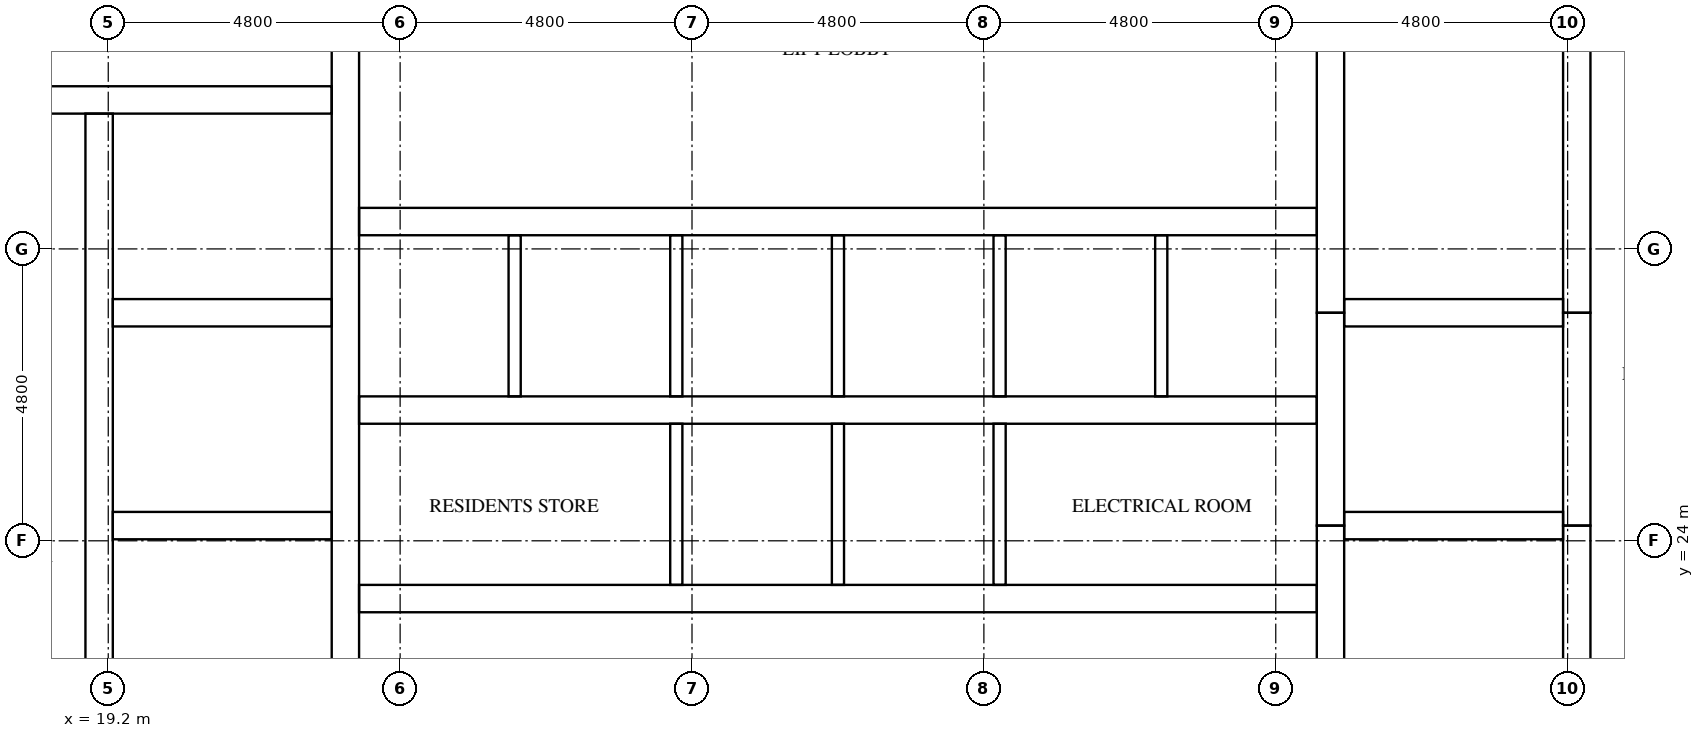
"""IFC4 building model, lengths in metres.
Left out: names, types, materials, properties, quantities, classifications, styles, units other than length and angle.
Written with IfcOpenShell. Run it as: python <this file> out.ifc"""

import sys

from ifc_helpers import new_model, si_unit, direction, frame, frame_2d, origin, place, context, subcontext, project, spatial, rectangle, extrude, element, fill, save


model = new_model("IFC4")
c1 = context("Model", 3, precision=1e-05, world=origin(), true_north=direction((0.0, 1.0)))
c2 = subcontext(c1, "Body", "Model", "MODEL_VIEW")
j1 = project(units=[si_unit("LENGTHUNIT", "METRE"), si_unit("PLANEANGLEUNIT", "RADIAN")], contexts=[c1])
p1 = place(None, origin())
s1 = spatial("IfcSite", under=j1, at=p1, CompositionType="ELEMENT")
p2 = place(p1, origin())
s2 = spatial("IfcBuilding", under=s1, at=p2, CompositionType="ELEMENT")
p3 = place(p2, frame((0.0, 0.0, 252.7)))
s3 = spatial("IfcBuildingStorey", under=s2, at=p3, CompositionType="ELEMENT", Elevation=252.7)
p4 = place(p3, frame((19.05, 15.6, 0.0), z_axis=(0.0, 0.0, 1.0), x_axis=(0.0, 1.0, 0.0)))
e1 = element("IfcWall", 1, at=p4, inside=s3, PredefinedType="SHEAR", context=c2, shape_type="SweptSolid", body=[
    extrude(rectangle(XDim=15.425, YDim=0.45, at=frame_2d((7.712, 0.0))), origin(), (0.0, 0.0, 1.0), 3.2),
])
p5 = place(p4, frame((9.85, 0.0, 0.0)))
e2 = element("IfcOpeningElement", 2, at=p5, cuts=e1, PredefinedType="OPENING", context=c2, shape_type="SweptSolid", body=[
    extrude(rectangle(XDim=1.1, YDim=2.1, at=frame_2d((0.55, 1.05))), frame((0.0, 0.235, 0.0), z_axis=(0.0, -1.0, 0.0), x_axis=(1.0, 0.0, 0.0)), (0.0, 0.0, 1.0), 0.47),
])
p6 = place(p4, frame((13.35, 0.0, 0.0)))
e3 = element("IfcOpeningElement", 3, at=p6, cuts=e1, PredefinedType="OPENING", context=c2, shape_type="SweptSolid", body=[
    extrude(rectangle(XDim=1.1, YDim=2.1, at=frame_2d((0.55, 1.05))), frame((0.0, 0.235, 0.0), z_axis=(0.0, -1.0, 0.0), x_axis=(1.0, 0.0, 0.0)), (0.0, 0.0, 1.0), 0.47),
])
p7 = place(p4, frame((0.6, 0.0, 0.0)))
e4 = element("IfcOpeningElement", 4, at=p7, cuts=e1, PredefinedType="OPENING", context=c2, shape_type="SweptSolid", body=[
    extrude(rectangle(XDim=1.2, YDim=2.1, at=frame_2d((0.6, 1.05))), frame((0.0, 0.235, 0.0), z_axis=(0.0, -1.0, 0.0), x_axis=(1.0, 0.0, 0.0)), (0.0, 0.0, 1.0), 0.47),
])
p8 = place(p3, frame((23.1, 15.6, 0.0), z_axis=(0.0, 0.0, 1.0), x_axis=(0.0, 1.0, 0.0)))
e5 = element("IfcWall", 5, at=p8, inside=s3, PredefinedType="SHEAR", context=c2, shape_type="SweptSolid", body=[
    extrude(rectangle(XDim=21.6, YDim=0.45, at=frame_2d((10.8, 0.0))), origin(), (0.0, 0.0, 1.0), 3.2),
])
p9 = place(p3, frame((39.3, 15.6, 0.0), z_axis=(0.0, 0.0, 1.0), x_axis=(0.0, 1.0, 0.0)))
e6 = element("IfcWall", 6, at=p9, inside=s3, PredefinedType="SHEAR", context=c2, shape_type="SweptSolid", body=[
    extrude(rectangle(XDim=8.65, YDim=0.45, at=frame_2d((4.325, 0.0))), origin(), (0.0, 0.0, 1.0), 3.2),
])
p10 = place(p3, frame((39.3, 24.25, 0.0), z_axis=(0.0, 0.0, 1.0), x_axis=(0.0, 1.0, 0.0)))
e7 = element("IfcWall", 7, at=p10, inside=s3, PredefinedType="SHEAR", context=c2, shape_type="SweptSolid", body=[
    extrude(rectangle(XDim=3.5, YDim=0.45, at=frame_2d((1.75, 0.0))), origin(), (0.0, 0.0, 1.0), 3.2),
])
p11 = place(p3, frame((39.3, 27.75, 0.0), z_axis=(0.0, 0.0, 1.0), x_axis=(0.0, 1.0, 0.0)))
e8 = element("IfcWall", 8, at=p11, inside=s3, PredefinedType="SHEAR", context=c2, shape_type="SweptSolid", body=[
    extrude(rectangle(XDim=9.45, YDim=0.45, at=frame_2d((4.725, 0.0))), origin(), (0.0, 0.0, 1.0), 3.2),
])
p12 = place(p3, frame((43.35, 15.6, 0.0), z_axis=(0.0, 0.0, 1.0), x_axis=(0.0, 1.0, 0.0)))
e9 = element("IfcWall", 9, at=p12, inside=s3, PredefinedType="SHEAR", context=c2, shape_type="SweptSolid", body=[
    extrude(rectangle(XDim=8.65, YDim=0.45, at=frame_2d((4.325, 0.0))), origin(), (0.0, 0.0, 1.0), 3.2),
])
p13 = place(p12, frame((0.6, 0.0, 0.0)))
e10 = element("IfcOpeningElement", 10, at=p13, cuts=e9, PredefinedType="OPENING", context=c2, shape_type="SweptSolid", body=[
    extrude(rectangle(XDim=1.2, YDim=2.1, at=frame_2d((0.6, 1.05))), frame((0.0, 0.235, 0.0), z_axis=(0.0, -1.0, 0.0), x_axis=(1.0, 0.0, 0.0)), (0.0, 0.0, 1.0), 0.47),
])
p14 = place(p3, frame((43.35, 24.25, 0.0), z_axis=(0.0, 0.0, 1.0), x_axis=(0.0, 1.0, 0.0)))
e11 = element("IfcWall", 11, at=p14, inside=s3, PredefinedType="SHEAR", context=c2, shape_type="SweptSolid", body=[
    extrude(rectangle(XDim=3.5, YDim=0.45, at=frame_2d((1.75, 0.0))), origin(), (0.0, 0.0, 1.0), 3.2),
])
p15 = place(p14, frame((1.2, 0.0, 0.0)))
e12 = element("IfcOpeningElement", 12, at=p15, cuts=e11, PredefinedType="OPENING", context=c2, shape_type="SweptSolid", body=[
    extrude(rectangle(XDim=1.1, YDim=2.1, at=frame_2d((0.55, 1.05))), frame((0.0, 0.235, 0.0), z_axis=(0.0, -1.0, 0.0), x_axis=(1.0, 0.0, 0.0)), (0.0, 0.0, 1.0), 0.47),
])
p16 = place(p3, frame((43.35, 27.75, 0.0), z_axis=(0.0, 0.0, 1.0), x_axis=(0.0, 1.0, 0.0)))
e13 = element("IfcWall", 13, at=p16, inside=s3, PredefinedType="SHEAR", context=c2, shape_type="SweptSolid", body=[
    extrude(rectangle(XDim=9.45, YDim=0.45, at=frame_2d((4.725, 0.0))), origin(), (0.0, 0.0, 1.0), 3.2),
])
p17 = place(p16, frame((7.65, 0.0, 0.0)))
e14 = element("IfcOpeningElement", 14, at=p17, cuts=e13, PredefinedType="OPENING", context=c2, shape_type="SweptSolid", body=[
    extrude(rectangle(XDim=1.2, YDim=2.1, at=frame_2d((0.6, 1.05))), frame((0.0, 0.235, 0.0), z_axis=(0.0, -1.0, 0.0), x_axis=(1.0, 0.0, 0.0)), (0.0, 0.0, 1.0), 0.47),
])
for number, where, z_axis, x_axis in (
    (15, (19.275, 24.25, 0.0), (0.0, 0.0, 1.0), (1.0, 0.0, 0.0)),
    (16, (19.275, 27.75, 0.0), (0.0, 0.0, 1.0), (1.0, 0.0, 0.0)),
):
    element("IfcWall", number, at=place(p3, frame(where, z_axis=z_axis, x_axis=x_axis)), inside=s3, PredefinedType="SHEAR", context=c2, shape_type="SweptSolid", body=[
        extrude(rectangle(XDim=3.6, YDim=0.45, at=frame_2d((1.8, 0.0))), origin(), (0.0, 0.0, 1.0), 3.2),
    ])
p18 = place(p3, frame((15.6, 31.25, 0.0), z_axis=(0.0, 0.0, 1.0), x_axis=(1.0, 0.0, 0.0)))
e17 = element("IfcWall", 17, at=p18, inside=s3, PredefinedType="SHEAR", context=c2, shape_type="SweptSolid", body=[
    extrude(rectangle(XDim=7.275, YDim=0.45, at=frame_2d((3.637, 0.0))), origin(), (0.0, 0.0, 1.0), 3.2),
])
for number, where, z_axis, x_axis in (
    (18, (39.525, 24.25, 0.0), (0.0, 0.0, 1.0), (1.0, 0.0, 0.0)),
    (19, (39.525, 27.75, 0.0), (0.0, 0.0, 1.0), (1.0, 0.0, 0.0)),
):
    element("IfcWall", number, at=place(p3, frame(where, z_axis=z_axis, x_axis=x_axis)), inside=s3, PredefinedType="SHEAR", context=c2, shape_type="SweptSolid", body=[
        extrude(rectangle(XDim=3.6, YDim=0.45, at=frame_2d((1.8, 0.0))), origin(), (0.0, 0.0, 1.0), 3.2),
    ])
p19 = place(p3, frame((23.325, 23.05, 0.0), z_axis=(0.0, 0.0, 1.0), x_axis=(1.0, 0.0, 0.0)))
e20 = element("IfcWall", 20, at=p19, inside=s3, PredefinedType="SHEAR", context=c2, shape_type="SweptSolid", body=[
    extrude(rectangle(XDim=15.75, YDim=0.45, at=frame_2d((7.875, 0.0))), origin(), (0.0, 0.0, 1.0), 3.2),
])
p20 = place(p19, frame((2.058, 0.0, 0.0)))
e21 = element("IfcOpeningElement", 21, at=p20, cuts=e20, PredefinedType="OPENING", context=c2, shape_type="SweptSolid", body=[
    extrude(rectangle(XDim=1.0, YDim=2.1, at=frame_2d((0.5, 1.05))), frame((0.0, 0.235, 0.0), z_axis=(0.0, -1.0, 0.0), x_axis=(1.0, 0.0, 0.0)), (0.0, 0.0, 1.0), 0.47),
])
p21 = place(p19, frame((12.692, 0.0, 0.0)))
e22 = element("IfcOpeningElement", 22, at=p21, cuts=e20, PredefinedType="OPENING", context=c2, shape_type="SweptSolid", body=[
    extrude(rectangle(XDim=1.0, YDim=2.1, at=frame_2d((0.5, 1.05))), frame((0.0, 0.235, 0.0), z_axis=(0.0, -1.0, 0.0), x_axis=(1.0, 0.0, 0.0)), (0.0, 0.0, 1.0), 0.47),
])
p22 = place(p3, frame((23.325, 26.15, 0.0), z_axis=(0.0, 0.0, 1.0), x_axis=(1.0, 0.0, 0.0)))
e23 = element("IfcWall", 23, at=p22, inside=s3, PredefinedType="SHEAR", context=c2, shape_type="SweptSolid", body=[
    extrude(rectangle(XDim=15.75, YDim=0.45, at=frame_2d((7.875, 0.0))), origin(), (0.0, 0.0, 1.0), 3.2),
])
p23 = place(p3, frame((23.325, 29.25, 0.0), z_axis=(0.0, 0.0, 1.0), x_axis=(1.0, 0.0, 0.0)))
e24 = element("IfcWall", 24, at=p23, inside=s3, PredefinedType="SHEAR", context=c2, shape_type="SweptSolid", body=[
    extrude(rectangle(XDim=15.75, YDim=0.45, at=frame_2d((7.875, 0.0))), origin(), (0.0, 0.0, 1.0), 3.2),
])
p24 = place(p23, frame((0.679, 0.0, 0.0)))
e25 = element("IfcOpeningElement", 25, at=p24, cuts=e24, PredefinedType="OPENING", context=c2, shape_type="SweptSolid", body=[
    extrude(rectangle(XDim=1.1, YDim=2.1, at=frame_2d((0.55, 1.05))), frame((0.0, 0.235, 0.0), z_axis=(0.0, -1.0, 0.0), x_axis=(1.0, 0.0, 0.0)), (0.0, 0.0, 1.0), 0.47),
])
p25 = place(p23, frame((3.337, 0.0, 0.0)))
e26 = element("IfcOpeningElement", 26, at=p25, cuts=e24, PredefinedType="OPENING", context=c2, shape_type="SweptSolid", body=[
    extrude(rectangle(XDim=1.1, YDim=2.1, at=frame_2d((0.55, 1.05))), frame((0.0, 0.235, 0.0), z_axis=(0.0, -1.0, 0.0), x_axis=(1.0, 0.0, 0.0)), (0.0, 0.0, 1.0), 0.47),
])
p26 = place(p23, frame((5.996, 0.0, 0.0)))
e27 = element("IfcOpeningElement", 27, at=p26, cuts=e24, PredefinedType="OPENING", context=c2, shape_type="SweptSolid", body=[
    extrude(rectangle(XDim=1.1, YDim=2.1, at=frame_2d((0.55, 1.05))), frame((0.0, 0.235, 0.0), z_axis=(0.0, -1.0, 0.0), x_axis=(1.0, 0.0, 0.0)), (0.0, 0.0, 1.0), 0.47),
])
p27 = place(p23, frame((8.654, 0.0, 0.0)))
e28 = element("IfcOpeningElement", 28, at=p27, cuts=e24, PredefinedType="OPENING", context=c2, shape_type="SweptSolid", body=[
    extrude(rectangle(XDim=1.1, YDim=2.1, at=frame_2d((0.55, 1.05))), frame((0.0, 0.235, 0.0), z_axis=(0.0, -1.0, 0.0), x_axis=(1.0, 0.0, 0.0)), (0.0, 0.0, 1.0), 0.47),
])
p28 = place(p23, frame((11.312, 0.0, 0.0)))
e29 = element("IfcOpeningElement", 29, at=p28, cuts=e24, PredefinedType="OPENING", context=c2, shape_type="SweptSolid", body=[
    extrude(rectangle(XDim=1.1, YDim=2.1, at=frame_2d((0.55, 1.05))), frame((0.0, 0.235, 0.0), z_axis=(0.0, -1.0, 0.0), x_axis=(1.0, 0.0, 0.0)), (0.0, 0.0, 1.0), 0.47),
])
p29 = place(p23, frame((13.971, 0.0, 0.0)))
e30 = element("IfcOpeningElement", 30, at=p29, cuts=e24, PredefinedType="OPENING", context=c2, shape_type="SweptSolid", body=[
    extrude(rectangle(XDim=1.1, YDim=2.1, at=frame_2d((0.55, 1.05))), frame((0.0, 0.235, 0.0), z_axis=(0.0, -1.0, 0.0), x_axis=(1.0, 0.0, 0.0)), (0.0, 0.0, 1.0), 0.47),
])
p30 = place(p3, frame((25.883, 26.375, 0.0), z_axis=(0.0, 0.0, 1.0), x_axis=(0.0, 1.0, 0.0)))
e31 = element("IfcWall", 31, at=p30, inside=s3, PredefinedType="SOLIDWALL", context=c2, shape_type="SweptSolid", body=[
    extrude(rectangle(XDim=2.65, YDim=0.2, at=frame_2d((1.325, 0.0))), origin(), (0.0, 0.0, 1.0), 3.2),
])
p31 = place(p3, frame((28.542, 23.275, 0.0), z_axis=(0.0, 0.0, 1.0), x_axis=(0.0, 1.0, 0.0)))
e32 = element("IfcWall", 32, at=p31, inside=s3, PredefinedType="SOLIDWALL", context=c2, shape_type="SweptSolid", body=[
    extrude(rectangle(XDim=2.65, YDim=0.2, at=frame_2d((1.325, 0.0))), origin(), (0.0, 0.0, 1.0), 3.2),
])
p32 = place(p3, frame((28.542, 26.375, 0.0), z_axis=(0.0, 0.0, 1.0), x_axis=(0.0, 1.0, 0.0)))
e33 = element("IfcWall", 33, at=p32, inside=s3, PredefinedType="SOLIDWALL", context=c2, shape_type="SweptSolid", body=[
    extrude(rectangle(XDim=2.65, YDim=0.2, at=frame_2d((1.325, 0.0))), origin(), (0.0, 0.0, 1.0), 3.2),
])
p33 = place(p3, frame((31.2, 23.275, 0.0), z_axis=(0.0, 0.0, 1.0), x_axis=(0.0, 1.0, 0.0)))
e34 = element("IfcWall", 34, at=p33, inside=s3, PredefinedType="SOLIDWALL", context=c2, shape_type="SweptSolid", body=[
    extrude(rectangle(XDim=2.65, YDim=0.2, at=frame_2d((1.325, 0.0))), origin(), (0.0, 0.0, 1.0), 3.2),
])
p34 = place(p3, frame((31.2, 26.375, 0.0), z_axis=(0.0, 0.0, 1.0), x_axis=(0.0, 1.0, 0.0)))
e35 = element("IfcWall", 35, at=p34, inside=s3, PredefinedType="SOLIDWALL", context=c2, shape_type="SweptSolid", body=[
    extrude(rectangle(XDim=2.65, YDim=0.2, at=frame_2d((1.325, 0.0))), origin(), (0.0, 0.0, 1.0), 3.2),
])
p35 = place(p3, frame((33.858, 23.275, 0.0), z_axis=(0.0, 0.0, 1.0), x_axis=(0.0, 1.0, 0.0)))
e36 = element("IfcWall", 36, at=p35, inside=s3, PredefinedType="SOLIDWALL", context=c2, shape_type="SweptSolid", body=[
    extrude(rectangle(XDim=2.65, YDim=0.2, at=frame_2d((1.325, 0.0))), origin(), (0.0, 0.0, 1.0), 3.2),
])
for number, where, z_axis, x_axis in (
    (37, (33.858, 26.375, 0.0), (0.0, 0.0, 1.0), (0.0, 1.0, 0.0)),
    (38, (36.517, 26.375, 0.0), (0.0, 0.0, 1.0), (0.0, 1.0, 0.0)),
):
    element("IfcWall", number, at=place(p3, frame(where, z_axis=z_axis, x_axis=x_axis)), inside=s3, PredefinedType="SOLIDWALL", context=c2, shape_type="SweptSolid", body=[
        extrude(rectangle(XDim=2.65, YDim=0.2, at=frame_2d((1.325, 0.0))), origin(), (0.0, 0.0, 1.0), 3.2),
    ])
p36 = place(p24, origin())
e39 = element("IfcDoor", 39, at=p36, inside=s3, OperationType="DOUBLE_DOOR_SLIDING", PredefinedType="DOOR", context=c2, shape_type="SweptSolid", body=[
    extrude(rectangle(XDim=1.1, YDim=2.1, at=frame_2d((0.55, 1.05))), frame((0.0, 0.025, 0.0), z_axis=(0.0, -1.0, 0.0), x_axis=(1.0, 0.0, 0.0)), (0.0, 0.0, 1.0), 0.05),
])
fill(e25, e39)
p37 = place(p25, origin())
e40 = element("IfcDoor", 40, at=p37, inside=s3, OperationType="DOUBLE_DOOR_SLIDING", PredefinedType="DOOR", context=c2, shape_type="SweptSolid", body=[
    extrude(rectangle(XDim=1.1, YDim=2.1, at=frame_2d((0.55, 1.05))), frame((0.0, 0.025, 0.0), z_axis=(0.0, -1.0, 0.0), x_axis=(1.0, 0.0, 0.0)), (0.0, 0.0, 1.0), 0.05),
])
fill(e26, e40)
p38 = place(p26, origin())
e41 = element("IfcDoor", 41, at=p38, inside=s3, OperationType="DOUBLE_DOOR_SLIDING", PredefinedType="DOOR", context=c2, shape_type="SweptSolid", body=[
    extrude(rectangle(XDim=1.1, YDim=2.1, at=frame_2d((0.55, 1.05))), frame((0.0, 0.025, 0.0), z_axis=(0.0, -1.0, 0.0), x_axis=(1.0, 0.0, 0.0)), (0.0, 0.0, 1.0), 0.05),
])
fill(e27, e41)
p39 = place(p27, origin())
e42 = element("IfcDoor", 42, at=p39, inside=s3, OperationType="DOUBLE_DOOR_SLIDING", PredefinedType="DOOR", context=c2, shape_type="SweptSolid", body=[
    extrude(rectangle(XDim=1.1, YDim=2.1, at=frame_2d((0.55, 1.05))), frame((0.0, 0.025, 0.0), z_axis=(0.0, -1.0, 0.0), x_axis=(1.0, 0.0, 0.0)), (0.0, 0.0, 1.0), 0.05),
])
fill(e28, e42)
p40 = place(p28, origin())
e43 = element("IfcDoor", 43, at=p40, inside=s3, OperationType="DOUBLE_DOOR_SLIDING", PredefinedType="DOOR", context=c2, shape_type="SweptSolid", body=[
    extrude(rectangle(XDim=1.1, YDim=2.1, at=frame_2d((0.55, 1.05))), frame((0.0, 0.025, 0.0), z_axis=(0.0, -1.0, 0.0), x_axis=(1.0, 0.0, 0.0)), (0.0, 0.0, 1.0), 0.05),
])
fill(e29, e43)
p41 = place(p29, origin())
e44 = element("IfcDoor", 44, at=p41, inside=s3, OperationType="DOUBLE_DOOR_SLIDING", PredefinedType="DOOR", context=c2, shape_type="SweptSolid", body=[
    extrude(rectangle(XDim=1.1, YDim=2.1, at=frame_2d((0.55, 1.05))), frame((0.0, 0.025, 0.0), z_axis=(0.0, -1.0, 0.0), x_axis=(1.0, 0.0, 0.0)), (0.0, 0.0, 1.0), 0.05),
])
fill(e30, e44)
p42 = place(p5, origin())
e45 = element("IfcDoor", 45, at=p42, inside=s3, OperationType="DOUBLE_DOOR_SLIDING", PredefinedType="DOOR", context=c2, shape_type="SweptSolid", body=[
    extrude(rectangle(XDim=1.1, YDim=2.1, at=frame_2d((0.55, 1.05))), frame((0.0, 0.025, 0.0), z_axis=(0.0, -1.0, 0.0), x_axis=(1.0, 0.0, 0.0)), (0.0, 0.0, 1.0), 0.05),
])
fill(e2, e45)
p43 = place(p6, origin())
e46 = element("IfcDoor", 46, at=p43, inside=s3, OperationType="DOUBLE_DOOR_SLIDING", PredefinedType="DOOR", context=c2, shape_type="SweptSolid", body=[
    extrude(rectangle(XDim=1.1, YDim=2.1, at=frame_2d((0.55, 1.05))), frame((0.0, 0.025, 0.0), z_axis=(0.0, -1.0, 0.0), x_axis=(1.0, 0.0, 0.0)), (0.0, 0.0, 1.0), 0.05),
])
fill(e3, e46)
p44 = place(p15, origin())
e47 = element("IfcDoor", 47, at=p44, inside=s3, OperationType="DOUBLE_DOOR_SLIDING", PredefinedType="DOOR", context=c2, shape_type="SweptSolid", body=[
    extrude(rectangle(XDim=1.1, YDim=2.1, at=frame_2d((0.55, 1.05))), frame((0.0, 0.025, 0.0), z_axis=(0.0, -1.0, 0.0), x_axis=(1.0, 0.0, 0.0)), (0.0, 0.0, 1.0), 0.05),
])
fill(e12, e47)
p45 = place(p20, frame((1.0, 0.0, 0.0), z_axis=(0.0, 0.0, 1.0), x_axis=(-1.0, 0.0, 0.0)))
e48 = element("IfcDoor", 48, at=p45, inside=s3, OperationType="SINGLE_SWING_LEFT", PredefinedType="DOOR", context=c2, shape_type="SweptSolid", body=[
    extrude(rectangle(XDim=1.0, YDim=2.1, at=frame_2d((0.5, 1.05))), frame((0.0, 0.025, 0.0), z_axis=(0.0, -1.0, 0.0), x_axis=(1.0, 0.0, 0.0)), (0.0, 0.0, 1.0), 0.05),
])
fill(e21, e48)
p46 = place(p21, frame((1.0, 0.0, 0.0), z_axis=(0.0, 0.0, 1.0), x_axis=(-1.0, 0.0, 0.0)))
e49 = element("IfcDoor", 49, at=p46, inside=s3, OperationType="SINGLE_SWING_RIGHT", PredefinedType="DOOR", context=c2, shape_type="SweptSolid", body=[
    extrude(rectangle(XDim=1.0, YDim=2.1, at=frame_2d((0.5, 1.05))), frame((0.0, 0.025, 0.0), z_axis=(0.0, -1.0, 0.0), x_axis=(1.0, 0.0, 0.0)), (0.0, 0.0, 1.0), 0.05),
])
fill(e22, e49)
save(model, sys.argv[1])
